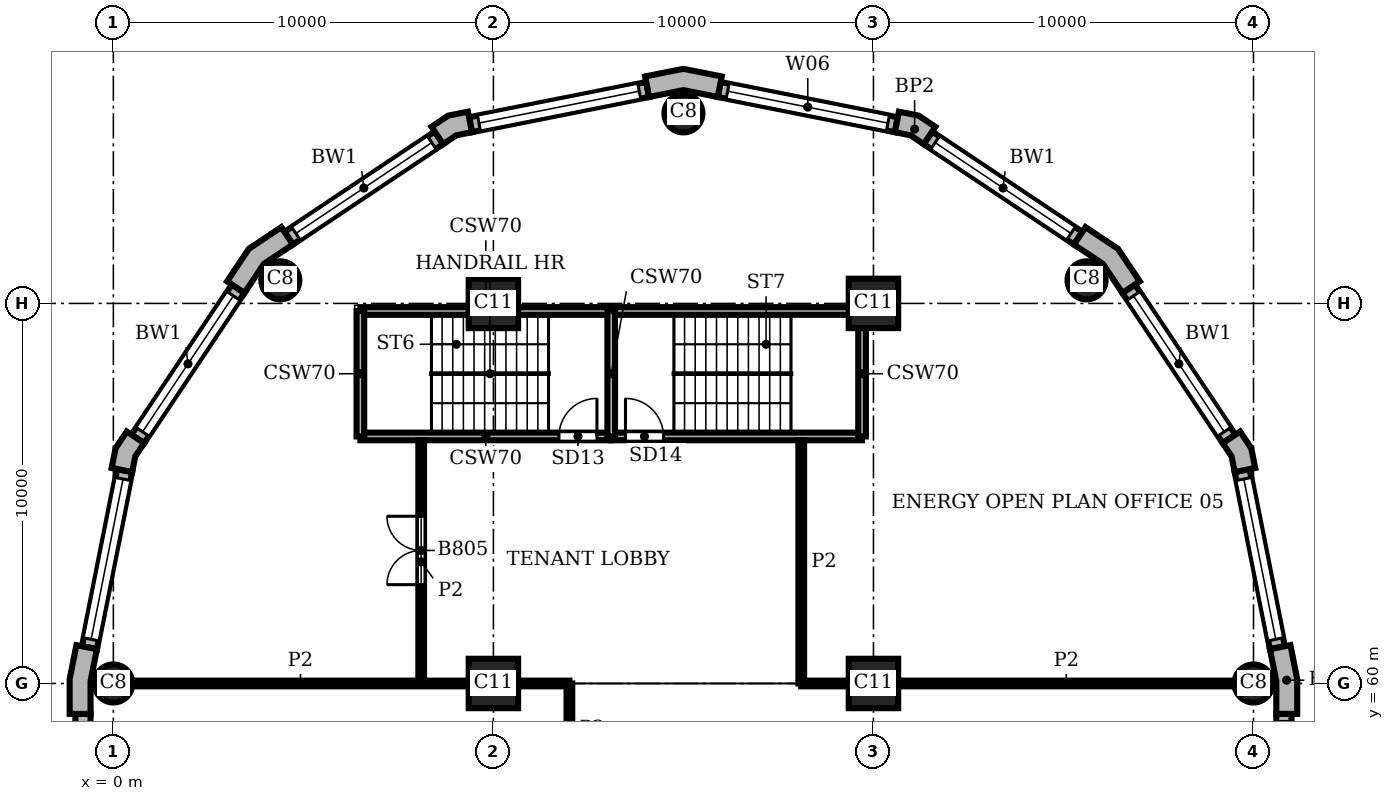
"""IFC4 building model, lengths in metres.
Left out: names, types, materials, properties, quantities, classifications, styles, units other than length and angle.
Written with IfcOpenShell. Run it as: python <this file> out.ifc"""

import sys

from ifc_helpers import new_model, si_unit, direction, frame, frame_2d, origin, origin_2d, place, context, subcontext, project, spatial, polyline, rectangle, circle, outline, extrude, element, fill, save


model = new_model("IFC4")
c1 = context("Model", 3, precision=1e-05, world=origin(), true_north=direction((0.0, 1.0)))
c2 = subcontext(c1, "Body", "Model", "MODEL_VIEW")
j1 = project(units=[si_unit("LENGTHUNIT", "METRE"), si_unit("PLANEANGLEUNIT", "RADIAN")], contexts=[c1])
p1 = place(None, origin())
s1 = spatial("IfcSite", under=j1, at=p1, CompositionType="ELEMENT")
p2 = place(p1, origin())
s2 = spatial("IfcBuilding", under=s1, at=p2, CompositionType="ELEMENT")
p3 = place(p2, frame((0.0, 0.0, 213.6)))
s3 = spatial("IfcBuildingStorey", under=s2, at=p3, CompositionType="ELEMENT", Elevation=213.6)
for number, where, z_axis, x_axis in (
    (1, (30.0, 60.0, 0.0), (0.0, 0.0, 1.0), (1.0, 0.0, 0.0)),
    (2, (25.607, 70.607, 0.0), (0.0, 0.0, 1.0), (1.0, 0.0, 0.0)),
    (3, (15.0, 75.0, 0.0), (0.0, 0.0, 1.0), (1.0, 0.0, 0.0)),
    (4, (4.393, 70.607, 0.0), (0.0, 0.0, 1.0), (1.0, 0.0, 0.0)),
    (5, (0.0, 60.0, 0.0), (0.0, 0.0, 1.0), (1.0, 0.0, 0.0)),
):
    element("IfcColumn", number, at=place(p3, frame(where, z_axis=z_axis, x_axis=x_axis)), inside=s3, PredefinedType="COLUMN", context=c2, shape_type="SweptSolid", body=[
        extrude(circle(Radius=0.5, at=origin_2d()), origin(), (0.0, 0.0, 1.0), 3.9),
    ])
for number, where, z_axis, x_axis in (
    (6, (10.0, 60.0, 0.0), (0.0, 0.0, 1.0), (1.0, 0.0, 0.0)),
    (7, (10.0, 70.0, 0.0), (0.0, 0.0, 1.0), (1.0, 0.0, 0.0)),
    (8, (20.0, 60.0, 0.0), (0.0, 0.0, 1.0), (1.0, 0.0, 0.0)),
    (9, (20.0, 70.0, 0.0), (0.0, 0.0, 1.0), (1.0, 0.0, 0.0)),
):
    element("IfcColumn", number, at=place(p3, frame(where, z_axis=z_axis, x_axis=x_axis)), inside=s3, PredefinedType="COLUMN", context=c2, shape_type="SweptSolid", body=[
        extrude(rectangle(XDim=1.3, YDim=1.3, at=origin_2d()), origin(), (0.0, 0.0, 1.0), 3.9),
    ])
p4 = place(p3, origin())
e10 = element("IfcWall", 10, at=p4, inside=s3, PredefinedType="SOLIDWALL", context=c2, shape_type="SweptSolid", body=[
    extrude(outline(polyline([(31.0, 59.2), (31.15, 59.2), (31.15, 60.113), (30.972, 61.009), (30.825, 60.98), (30.432, 60.902), (30.6, 60.059), (30.6, 59.2), (31.0, 59.2)])), origin(), (0.0, 0.0, 1.0), 3.9),
])
e11 = element("IfcWall", 11, at=p4, inside=s3, PredefinedType="SOLIDWALL", context=c2, shape_type="SweptSolid", body=[
    extrude(outline(polyline([(29.897, 65.641), (30.045, 65.67), (29.941, 66.189), (29.648, 66.629), (29.523, 66.545), (29.19, 66.323), (29.423, 65.974), (29.505, 65.563), (29.897, 65.641)])), origin(), (0.0, 0.0, 1.0), 3.9),
])
e12 = element("IfcWall", 12, at=p4, inside=s3, PredefinedType="SOLIDWALL", context=c2, shape_type="SweptSolid", body=[
    extrude(outline(polyline([(26.883, 70.497), (27.007, 70.58), (26.436, 71.436), (25.58, 72.007), (25.497, 71.883), (25.275, 71.55), (26.039, 71.039), (26.55, 70.275), (26.883, 70.497)])), origin(), (0.0, 0.0, 1.0), 3.9),
])
e13 = element("IfcWall", 13, at=p4, inside=s3, PredefinedType="SOLIDWALL", context=c2, shape_type="SweptSolid", body=[
    extrude(outline(polyline([(21.545, 74.523), (21.629, 74.648), (21.189, 74.941), (20.67, 75.045), (20.641, 74.897), (20.563, 74.505), (20.974, 74.423), (21.323, 74.19), (21.545, 74.523)])), origin(), (0.0, 0.0, 1.0), 3.9),
])
e14 = element("IfcWall", 14, at=p4, inside=s3, PredefinedType="SOLIDWALL", context=c2, shape_type="SweptSolid", body=[
    extrude(outline(polyline([(15.98, 75.825), (16.009, 75.972), (15.0, 76.173), (13.991, 75.972), (14.02, 75.825), (14.098, 75.432), (15.0, 75.612), (15.902, 75.432), (15.98, 75.825)])), origin(), (0.0, 0.0, 1.0), 3.9),
])
e15 = element("IfcWall", 15, at=p4, inside=s3, PredefinedType="SOLIDWALL", context=c2, shape_type="SweptSolid", body=[
    extrude(outline(polyline([(9.359, 74.897), (9.33, 75.045), (8.811, 74.941), (8.371, 74.648), (8.455, 74.523), (8.677, 74.19), (9.026, 74.423), (9.437, 74.505), (9.359, 74.897)])), origin(), (0.0, 0.0, 1.0), 3.9),
])
e16 = element("IfcWall", 16, at=p4, inside=s3, PredefinedType="SOLIDWALL", context=c2, shape_type="SweptSolid", body=[
    extrude(outline(polyline([(4.503, 71.883), (4.42, 72.007), (3.564, 71.436), (2.993, 70.58), (3.117, 70.497), (3.45, 70.275), (3.961, 71.039), (4.725, 71.55), (4.503, 71.883)])), origin(), (0.0, 0.0, 1.0), 3.9),
])
e17 = element("IfcWall", 17, at=p4, inside=s3, PredefinedType="SOLIDWALL", context=c2, shape_type="SweptSolid", body=[
    extrude(outline(polyline([(0.477, 66.545), (0.352, 66.629), (0.059, 66.189), (-0.045, 65.67), (0.103, 65.641), (0.495, 65.563), (0.577, 65.974), (0.81, 66.323), (0.477, 66.545)])), origin(), (0.0, 0.0, 1.0), 3.9),
])
e18 = element("IfcWall", 18, at=p4, inside=s3, PredefinedType="SOLIDWALL", context=c2, shape_type="SweptSolid", body=[
    extrude(outline(polyline([(-0.825, 60.98), (-0.972, 61.009), (-1.15, 60.113), (-1.15, 59.2), (-1.0, 59.2), (-0.6, 59.2), (-0.6, 60.059), (-0.432, 60.902), (-0.825, 60.98)])), origin(), (0.0, 0.0, 1.0), 3.9),
])
p5 = place(p3, frame((30.8, 40.8, 0.0), z_axis=(0.0, 0.0, 1.0), x_axis=(0.0, 1.0, 0.0)))
e19 = element("IfcWall", 19, at=p5, inside=s3, PredefinedType="SOLIDWALL", context=c2, shape_type="SweptSolid", body=[
    extrude(rectangle(XDim=18.4, YDim=0.4, at=frame_2d((9.2, 0.0))), origin(), (0.0, 0.0, 1.0), 3.9),
])
p6 = place(p5, frame((0.2, 0.0, 0.9)))
e20 = element("IfcOpeningElement", 20, at=p6, cuts=e19, PredefinedType="OPENING", context=c2, shape_type="SweptSolid", body=[
    extrude(rectangle(XDim=8.0, YDim=2.35, at=frame_2d((4.0, 1.175))), frame((0.0, 0.21, 0.0), z_axis=(0.0, -1.0, 0.0), x_axis=(1.0, 0.0, 0.0)), (0.0, 0.0, 1.0), 0.42),
])
p7 = place(p5, frame((10.2, 0.0, 0.9)))
e21 = element("IfcOpeningElement", 21, at=p7, cuts=e19, PredefinedType="OPENING", context=c2, shape_type="SweptSolid", body=[
    extrude(rectangle(XDim=8.0, YDim=2.35, at=frame_2d((4.0, 1.175))), frame((0.0, 0.21, 0.0), z_axis=(0.0, -1.0, 0.0), x_axis=(1.0, 0.0, 0.0)), (0.0, 0.0, 1.0), 0.42),
])
p8 = place(p3, frame((30.629, 60.941, 0.0), z_axis=(0.0, 0.0, 1.0), x_axis=(-0.195098533057, 0.98078364709, 0.0)))
e22 = element("IfcWall", 22, at=p8, inside=s3, PredefinedType="SOLIDWALL", context=c2, shape_type="SweptSolid", body=[
    extrude(rectangle(XDim=4.753, YDim=0.4, at=frame_2d((2.376, 0.0))), origin(), (0.0, 0.0, 1.0), 3.9),
])
p9 = place(p8, frame((0.226, 0.0, 0.9)))
e23 = element("IfcOpeningElement", 23, at=p9, cuts=e22, PredefinedType="OPENING", context=c2, shape_type="SweptSolid", body=[
    extrude(rectangle(XDim=4.3, YDim=2.35, at=frame_2d((2.15, 1.175))), frame((0.0, 0.21, 0.0), z_axis=(0.0, -1.0, 0.0), x_axis=(1.0, 0.0, 0.0)), (0.0, 0.0, 1.0), 0.42),
])
p10 = place(p3, frame((29.357, 66.434, 0.0), z_axis=(0.0, 0.0, 1.0), x_axis=(-0.555541552266, 0.831488775454, 0.0)))
e24 = element("IfcWall", 24, at=p10, inside=s3, PredefinedType="SOLIDWALL", context=c2, shape_type="SweptSolid", body=[
    extrude(rectangle(XDim=4.753, YDim=0.4, at=frame_2d((2.376, 0.0))), origin(), (0.0, 0.0, 1.0), 3.9),
])
p11 = place(p10, frame((0.226, 0.0, 0.9)))
e25 = element("IfcOpeningElement", 25, at=p11, cuts=e24, PredefinedType="OPENING", context=c2, shape_type="SweptSolid", body=[
    extrude(rectangle(XDim=4.3, YDim=2.35, at=frame_2d((2.15, 1.175))), frame((0.0, 0.21, 0.0), z_axis=(0.0, -1.0, 0.0), x_axis=(1.0, 0.0, 0.0)), (0.0, 0.0, 1.0), 0.42),
])
p12 = place(p3, frame((25.386, 71.716, 0.0), z_axis=(0.0, 0.0, 1.0), x_axis=(-0.831488775454, 0.555541552266, 0.0)))
e26 = element("IfcWall", 26, at=p12, inside=s3, PredefinedType="SOLIDWALL", context=c2, shape_type="SweptSolid", body=[
    extrude(rectangle(XDim=4.753, YDim=0.4, at=frame_2d((2.376, 0.0))), origin(), (0.0, 0.0, 1.0), 3.9),
])
p13 = place(p12, frame((0.226, 0.0, 0.9)))
e27 = element("IfcOpeningElement", 27, at=p13, cuts=e26, PredefinedType="OPENING", context=c2, shape_type="SweptSolid", body=[
    extrude(rectangle(XDim=4.3, YDim=2.35, at=frame_2d((2.15, 1.175))), frame((0.0, 0.21, 0.0), z_axis=(0.0, -1.0, 0.0), x_axis=(1.0, 0.0, 0.0)), (0.0, 0.0, 1.0), 0.42),
])
p14 = place(p3, frame((20.602, 74.701, 0.0), z_axis=(0.0, 0.0, 1.0), x_axis=(-0.98078364709, 0.195098533057, 0.0)))
e28 = element("IfcWall", 28, at=p14, inside=s3, PredefinedType="SOLIDWALL", context=c2, shape_type="SweptSolid", body=[
    extrude(rectangle(XDim=4.753, YDim=0.4, at=frame_2d((2.376, 0.0))), origin(), (0.0, 0.0, 1.0), 3.9),
])
p15 = place(p14, frame((0.226, 0.0, 0.9)))
e29 = element("IfcOpeningElement", 29, at=p15, cuts=e28, PredefinedType="OPENING", context=c2, shape_type="SweptSolid", body=[
    extrude(rectangle(XDim=4.3, YDim=2.35, at=frame_2d((2.15, 1.175))), frame((0.0, 0.21, 0.0), z_axis=(0.0, -1.0, 0.0), x_axis=(1.0, 0.0, 0.0)), (0.0, 0.0, 1.0), 0.42),
])
p16 = place(p3, frame((14.059, 75.629, 0.0), z_axis=(0.0, 0.0, 1.0), x_axis=(-0.98078364709, -0.195098533057, 0.0)))
e30 = element("IfcWall", 30, at=p16, inside=s3, PredefinedType="SOLIDWALL", context=c2, shape_type="SweptSolid", body=[
    extrude(rectangle(XDim=4.753, YDim=0.4, at=frame_2d((2.376, 0.0))), origin(), (0.0, 0.0, 1.0), 3.9),
])
p17 = place(p16, frame((0.226, 0.0, 0.9)))
e31 = element("IfcOpeningElement", 31, at=p17, cuts=e30, PredefinedType="OPENING", context=c2, shape_type="SweptSolid", body=[
    extrude(rectangle(XDim=4.3, YDim=2.35, at=frame_2d((2.15, 1.175))), frame((0.0, 0.21, 0.0), z_axis=(0.0, -1.0, 0.0), x_axis=(1.0, 0.0, 0.0)), (0.0, 0.0, 1.0), 0.42),
])
p18 = place(p3, frame((8.566, 74.357, 0.0), z_axis=(0.0, 0.0, 1.0), x_axis=(-0.831488775454, -0.555541552266, 0.0)))
e32 = element("IfcWall", 32, at=p18, inside=s3, PredefinedType="SOLIDWALL", context=c2, shape_type="SweptSolid", body=[
    extrude(rectangle(XDim=4.753, YDim=0.4, at=frame_2d((2.376, 0.0))), origin(), (0.0, 0.0, 1.0), 3.9),
])
p19 = place(p18, frame((0.226, 0.0, 0.9)))
e33 = element("IfcOpeningElement", 33, at=p19, cuts=e32, PredefinedType="OPENING", context=c2, shape_type="SweptSolid", body=[
    extrude(rectangle(XDim=4.3, YDim=2.35, at=frame_2d((2.15, 1.175))), frame((0.0, 0.21, 0.0), z_axis=(0.0, -1.0, 0.0), x_axis=(1.0, 0.0, 0.0)), (0.0, 0.0, 1.0), 0.42),
])
p20 = place(p3, frame((3.284, 70.386, 0.0), z_axis=(0.0, 0.0, 1.0), x_axis=(-0.555541552266, -0.831488775454, 0.0)))
e34 = element("IfcWall", 34, at=p20, inside=s3, PredefinedType="SOLIDWALL", context=c2, shape_type="SweptSolid", body=[
    extrude(rectangle(XDim=4.753, YDim=0.4, at=frame_2d((2.376, 0.0))), origin(), (0.0, 0.0, 1.0), 3.9),
])
p21 = place(p20, frame((0.226, 0.0, 0.9)))
e35 = element("IfcOpeningElement", 35, at=p21, cuts=e34, PredefinedType="OPENING", context=c2, shape_type="SweptSolid", body=[
    extrude(rectangle(XDim=4.3, YDim=2.35, at=frame_2d((2.15, 1.175))), frame((0.0, 0.21, 0.0), z_axis=(0.0, -1.0, 0.0), x_axis=(1.0, 0.0, 0.0)), (0.0, 0.0, 1.0), 0.42),
])
p22 = place(p3, frame((0.299, 65.602, 0.0), z_axis=(0.0, 0.0, 1.0), x_axis=(-0.195098533057, -0.98078364709, 0.0)))
e36 = element("IfcWall", 36, at=p22, inside=s3, PredefinedType="SOLIDWALL", context=c2, shape_type="SweptSolid", body=[
    extrude(rectangle(XDim=4.753, YDim=0.4, at=frame_2d((2.376, 0.0))), origin(), (0.0, 0.0, 1.0), 3.9),
])
p23 = place(p22, frame((0.226, 0.0, 0.9)))
e37 = element("IfcOpeningElement", 37, at=p23, cuts=e36, PredefinedType="OPENING", context=c2, shape_type="SweptSolid", body=[
    extrude(rectangle(XDim=4.3, YDim=2.35, at=frame_2d((2.15, 1.175))), frame((0.0, 0.21, 0.0), z_axis=(0.0, -1.0, 0.0), x_axis=(1.0, 0.0, 0.0)), (0.0, 0.0, 1.0), 0.42),
])
p24 = place(p3, frame((-0.8, 59.2, 0.0), z_axis=(0.0, 0.0, 1.0), x_axis=(0.0, -1.0, 0.0)))
e38 = element("IfcWall", 38, at=p24, inside=s3, PredefinedType="SOLIDWALL", context=c2, shape_type="SweptSolid", body=[
    extrude(rectangle(XDim=18.4, YDim=0.4, at=frame_2d((9.2, 0.0))), origin(), (0.0, 0.0, 1.0), 3.9),
])
p25 = place(p24, frame((3.75, 0.0, 0.9)))
e39 = element("IfcOpeningElement", 39, at=p25, cuts=e38, PredefinedType="OPENING", context=c2, shape_type="SweptSolid", body=[
    extrude(rectangle(XDim=0.9, YDim=2.35, at=frame_2d((0.45, 1.175))), frame((0.0, 0.21, 0.0), z_axis=(0.0, -1.0, 0.0), x_axis=(1.0, 0.0, 0.0)), (0.0, 0.0, 1.0), 0.42),
])
p26 = place(p24, frame((13.75, 0.0, 0.9)))
e40 = element("IfcOpeningElement", 40, at=p26, cuts=e38, PredefinedType="OPENING", context=c2, shape_type="SweptSolid", body=[
    extrude(rectangle(XDim=0.9, YDim=2.35, at=frame_2d((0.45, 1.175))), frame((0.0, 0.21, 0.0), z_axis=(0.0, -1.0, 0.0), x_axis=(1.0, 0.0, 0.0)), (0.0, 0.0, 1.0), 0.42),
])
p27 = place(p3, frame((6.5, 66.5, 0.0), z_axis=(0.0, 0.0, 1.0), x_axis=(1.0, 0.0, 0.0)))
e41 = element("IfcWall", 41, at=p27, inside=s3, PredefinedType="SHEAR", context=c2, shape_type="SweptSolid", body=[
    extrude(rectangle(XDim=6.6, YDim=0.2, at=frame_2d((3.3, 0.0))), origin(), (0.0, 0.0, 1.0), 3.58),
])
p28 = place(p27, frame((5.225, 0.0, 0.0)))
e42 = element("IfcOpeningElement", 42, at=p28, cuts=e41, PredefinedType="OPENING", context=c2, shape_type="SweptSolid", body=[
    extrude(rectangle(XDim=1.0, YDim=2.1, at=frame_2d((0.5, 1.05))), frame((0.0, 0.11, 0.0), z_axis=(0.0, -1.0, 0.0), x_axis=(1.0, 0.0, 0.0)), (0.0, 0.0, 1.0), 0.22),
])
p29 = place(p3, frame((13.1, 66.5, 0.0), z_axis=(0.0, 0.0, 1.0), x_axis=(1.0, 0.0, 0.0)))
e43 = element("IfcWall", 43, at=p29, inside=s3, PredefinedType="SHEAR", context=c2, shape_type="SweptSolid", body=[
    extrude(rectangle(XDim=6.6, YDim=0.2, at=frame_2d((3.3, 0.0))), origin(), (0.0, 0.0, 1.0), 3.58),
])
p30 = place(p29, frame((0.375, 0.0, 0.0)))
e44 = element("IfcOpeningElement", 44, at=p30, cuts=e43, PredefinedType="OPENING", context=c2, shape_type="SweptSolid", body=[
    extrude(rectangle(XDim=1.0, YDim=2.1, at=frame_2d((0.5, 1.05))), frame((0.0, 0.11, 0.0), z_axis=(0.0, -1.0, 0.0), x_axis=(1.0, 0.0, 0.0)), (0.0, 0.0, 1.0), 0.22),
])
p31 = place(p3, frame((6.5, 69.8, 0.0), z_axis=(0.0, 0.0, 1.0), x_axis=(1.0, 0.0, 0.0)))
e45 = element("IfcWall", 45, at=p31, inside=s3, PredefinedType="SHEAR", context=c2, shape_type="SweptSolid", body=[
    extrude(rectangle(XDim=6.6, YDim=0.2, at=frame_2d((3.3, 0.0))), origin(), (0.0, 0.0, 1.0), 3.58),
])
p32 = place(p3, frame((13.1, 69.8, 0.0), z_axis=(0.0, 0.0, 1.0), x_axis=(1.0, 0.0, 0.0)))
e46 = element("IfcWall", 46, at=p32, inside=s3, PredefinedType="SHEAR", context=c2, shape_type="SweptSolid", body=[
    extrude(rectangle(XDim=6.6, YDim=0.2, at=frame_2d((3.3, 0.0))), origin(), (0.0, 0.0, 1.0), 3.58),
])
for number, where, z_axis, x_axis in (
    (47, (6.5, 66.5, 0.0), (0.0, 0.0, 1.0), (0.0, 1.0, 0.0)),
    (48, (13.1, 66.5, 0.0), (0.0, 0.0, 1.0), (0.0, 1.0, 0.0)),
    (49, (19.7, 66.5, 0.0), (0.0, 0.0, 1.0), (0.0, 1.0, 0.0)),
):
    element("IfcWall", number, at=place(p3, frame(where, z_axis=z_axis, x_axis=x_axis)), inside=s3, PredefinedType="SHEAR", context=c2, shape_type="SweptSolid", body=[
        extrude(rectangle(XDim=3.3, YDim=0.2, at=frame_2d((1.65, 0.0))), origin(), (0.0, 0.0, 1.0), 3.58),
    ])
p33 = place(p3, frame((8.1, 60.0, 0.0), z_axis=(0.0, 0.0, 1.0), x_axis=(0.0, 1.0, 0.0)))
e50 = element("IfcWall", 50, at=p33, inside=s3, PredefinedType="PARTITIONING", context=c2, shape_type="SweptSolid", body=[
    extrude(rectangle(XDim=6.4, YDim=0.15, at=frame_2d((3.2, 0.0))), origin(), (0.0, 0.0, 1.0), 3.58),
])
p34 = place(p33, frame((2.6, 0.0, 0.0)))
e51 = element("IfcOpeningElement", 51, at=p34, cuts=e50, PredefinedType="OPENING", context=c2, shape_type="SweptSolid", body=[
    extrude(rectangle(XDim=1.8, YDim=2.1, at=frame_2d((0.9, 1.05))), frame((0.0, 0.085, 0.0), z_axis=(0.0, -1.0, 0.0), x_axis=(1.0, 0.0, 0.0)), (0.0, 0.0, 1.0), 0.17),
])
p35 = place(p3, frame((12.0, 57.6, 0.0), z_axis=(0.0, 0.0, 1.0), x_axis=(0.0, 1.0, 0.0)))
e52 = element("IfcWall", 52, at=p35, inside=s3, PredefinedType="PARTITIONING", context=c2, shape_type="SweptSolid", body=[
    extrude(rectangle(XDim=2.4, YDim=0.15, at=frame_2d((1.2, 0.0))), origin(), (0.0, 0.0, 1.0), 3.58),
])
p36 = place(p3, frame((18.1, 60.0, 0.0), z_axis=(0.0, 0.0, 1.0), x_axis=(0.0, 1.0, 0.0)))
e53 = element("IfcWall", 53, at=p36, inside=s3, PredefinedType="PARTITIONING", context=c2, shape_type="SweptSolid", body=[
    extrude(rectangle(XDim=6.4, YDim=0.15, at=frame_2d((3.2, 0.0))), origin(), (0.0, 0.0, 1.0), 3.58),
])
p37 = place(p3, frame((0.5, 60.0, 0.0), z_axis=(0.0, 0.0, 1.0), x_axis=(1.0, 0.0, 0.0)))
e54 = element("IfcWall", 54, at=p37, inside=s3, PredefinedType="PARTITIONING", context=c2, shape_type="SweptSolid", body=[
    extrude(rectangle(XDim=8.85, YDim=0.15, at=frame_2d((4.425, 0.0))), origin(), (0.0, 0.0, 1.0), 3.58),
])
p38 = place(p3, frame((10.65, 60.0, 0.0), z_axis=(0.0, 0.0, 1.0), x_axis=(1.0, 0.0, 0.0)))
e55 = element("IfcWall", 55, at=p38, inside=s3, PredefinedType="PARTITIONING", context=c2, shape_type="SweptSolid", body=[
    extrude(rectangle(XDim=1.35, YDim=0.15, at=frame_2d((0.675, 0.0))), origin(), (0.0, 0.0, 1.0), 3.58),
])
p39 = place(p3, frame((18.1, 60.0, 0.0), z_axis=(0.0, 0.0, 1.0), x_axis=(1.0, 0.0, 0.0)))
e56 = element("IfcWall", 56, at=p39, inside=s3, PredefinedType="PARTITIONING", context=c2, shape_type="SweptSolid", body=[
    extrude(rectangle(XDim=1.25, YDim=0.15, at=frame_2d((0.625, 0.0))), origin(), (0.0, 0.0, 1.0), 3.58),
])
p40 = place(p3, frame((20.65, 60.0, 0.0), z_axis=(0.0, 0.0, 1.0), x_axis=(1.0, 0.0, 0.0)))
e57 = element("IfcWall", 57, at=p40, inside=s3, PredefinedType="PARTITIONING", context=c2, shape_type="SweptSolid", body=[
    extrude(rectangle(XDim=8.85, YDim=0.15, at=frame_2d((4.425, 0.0))), origin(), (0.0, 0.0, 1.0), 3.58),
])
p41 = place(p9, origin())
e58 = element("IfcWindow", 58, at=p41, inside=s3, PartitioningType="SINGLE_PANEL", PredefinedType="WINDOW", context=c2, shape_type="SweptSolid", body=[
    extrude(rectangle(XDim=4.3, YDim=2.35, at=frame_2d((2.15, 1.175))), frame((0.0, 0.16, 0.0), z_axis=(0.0, -1.0, 0.0), x_axis=(1.0, 0.0, 0.0)), (0.0, 0.0, 1.0), 0.06),
])
fill(e23, e58)
p42 = place(p11, origin())
e59 = element("IfcWindow", 59, at=p42, inside=s3, PartitioningType="SINGLE_PANEL", PredefinedType="WINDOW", context=c2, shape_type="SweptSolid", body=[
    extrude(rectangle(XDim=4.3, YDim=2.35, at=frame_2d((2.15, 1.175))), frame((0.0, 0.16, 0.0), z_axis=(0.0, -1.0, 0.0), x_axis=(1.0, 0.0, 0.0)), (0.0, 0.0, 1.0), 0.06),
])
fill(e25, e59)
p43 = place(p13, origin())
e60 = element("IfcWindow", 60, at=p43, inside=s3, PartitioningType="SINGLE_PANEL", PredefinedType="WINDOW", context=c2, shape_type="SweptSolid", body=[
    extrude(rectangle(XDim=4.3, YDim=2.35, at=frame_2d((2.15, 1.175))), frame((0.0, 0.16, 0.0), z_axis=(0.0, -1.0, 0.0), x_axis=(1.0, 0.0, 0.0)), (0.0, 0.0, 1.0), 0.06),
])
fill(e27, e60)
p44 = place(p15, origin())
e61 = element("IfcWindow", 61, at=p44, inside=s3, PartitioningType="SINGLE_PANEL", PredefinedType="WINDOW", context=c2, shape_type="SweptSolid", body=[
    extrude(rectangle(XDim=4.3, YDim=2.35, at=frame_2d((2.15, 1.175))), frame((0.0, 0.16, 0.0), z_axis=(0.0, -1.0, 0.0), x_axis=(1.0, 0.0, 0.0)), (0.0, 0.0, 1.0), 0.06),
])
fill(e29, e61)
p45 = place(p17, origin())
e62 = element("IfcWindow", 62, at=p45, inside=s3, PartitioningType="SINGLE_PANEL", PredefinedType="WINDOW", context=c2, shape_type="SweptSolid", body=[
    extrude(rectangle(XDim=4.3, YDim=2.35, at=frame_2d((2.15, 1.175))), frame((0.0, 0.16, 0.0), z_axis=(0.0, -1.0, 0.0), x_axis=(1.0, 0.0, 0.0)), (0.0, 0.0, 1.0), 0.06),
])
fill(e31, e62)
p46 = place(p19, origin())
e63 = element("IfcWindow", 63, at=p46, inside=s3, PartitioningType="SINGLE_PANEL", PredefinedType="WINDOW", context=c2, shape_type="SweptSolid", body=[
    extrude(rectangle(XDim=4.3, YDim=2.35, at=frame_2d((2.15, 1.175))), frame((0.0, 0.16, 0.0), z_axis=(0.0, -1.0, 0.0), x_axis=(1.0, 0.0, 0.0)), (0.0, 0.0, 1.0), 0.06),
])
fill(e33, e63)
p47 = place(p21, origin())
e64 = element("IfcWindow", 64, at=p47, inside=s3, PartitioningType="SINGLE_PANEL", PredefinedType="WINDOW", context=c2, shape_type="SweptSolid", body=[
    extrude(rectangle(XDim=4.3, YDim=2.35, at=frame_2d((2.15, 1.175))), frame((0.0, 0.16, 0.0), z_axis=(0.0, -1.0, 0.0), x_axis=(1.0, 0.0, 0.0)), (0.0, 0.0, 1.0), 0.06),
])
fill(e35, e64)
p48 = place(p23, origin())
e65 = element("IfcWindow", 65, at=p48, inside=s3, PartitioningType="SINGLE_PANEL", PredefinedType="WINDOW", context=c2, shape_type="SweptSolid", body=[
    extrude(rectangle(XDim=4.3, YDim=2.35, at=frame_2d((2.15, 1.175))), frame((0.0, 0.16, 0.0), z_axis=(0.0, -1.0, 0.0), x_axis=(1.0, 0.0, 0.0)), (0.0, 0.0, 1.0), 0.06),
])
fill(e37, e65)
p49 = place(p28, origin())
e66 = element("IfcDoor", 66, at=p49, inside=s3, OperationType="SINGLE_SWING_RIGHT", PredefinedType="DOOR", context=c2, shape_type="SweptSolid", body=[
    extrude(rectangle(XDim=1.0, YDim=2.1, at=frame_2d((0.5, 1.05))), frame((0.0, 0.025, 0.0), z_axis=(0.0, -1.0, 0.0), x_axis=(1.0, 0.0, 0.0)), (0.0, 0.0, 1.0), 0.05),
])
fill(e42, e66)
p50 = place(p30, origin())
e67 = element("IfcDoor", 67, at=p50, inside=s3, OperationType="SINGLE_SWING_LEFT", PredefinedType="DOOR", context=c2, shape_type="SweptSolid", body=[
    extrude(rectangle(XDim=1.0, YDim=2.1, at=frame_2d((0.5, 1.05))), frame((0.0, 0.025, 0.0), z_axis=(0.0, -1.0, 0.0), x_axis=(1.0, 0.0, 0.0)), (0.0, 0.0, 1.0), 0.05),
])
fill(e44, e67)
p51 = place(p34, origin())
e68 = element("IfcDoor", 68, at=p51, inside=s3, OperationType="DOUBLE_DOOR_SINGLE_SWING", PredefinedType="DOOR", context=c2, shape_type="SweptSolid", body=[
    extrude(rectangle(XDim=1.8, YDim=2.1, at=frame_2d((0.9, 1.05))), frame((0.0, 0.025, 0.0), z_axis=(0.0, -1.0, 0.0), x_axis=(1.0, 0.0, 0.0)), (0.0, 0.0, 1.0), 0.05),
])
fill(e51, e68)
save(model, sys.argv[1])
